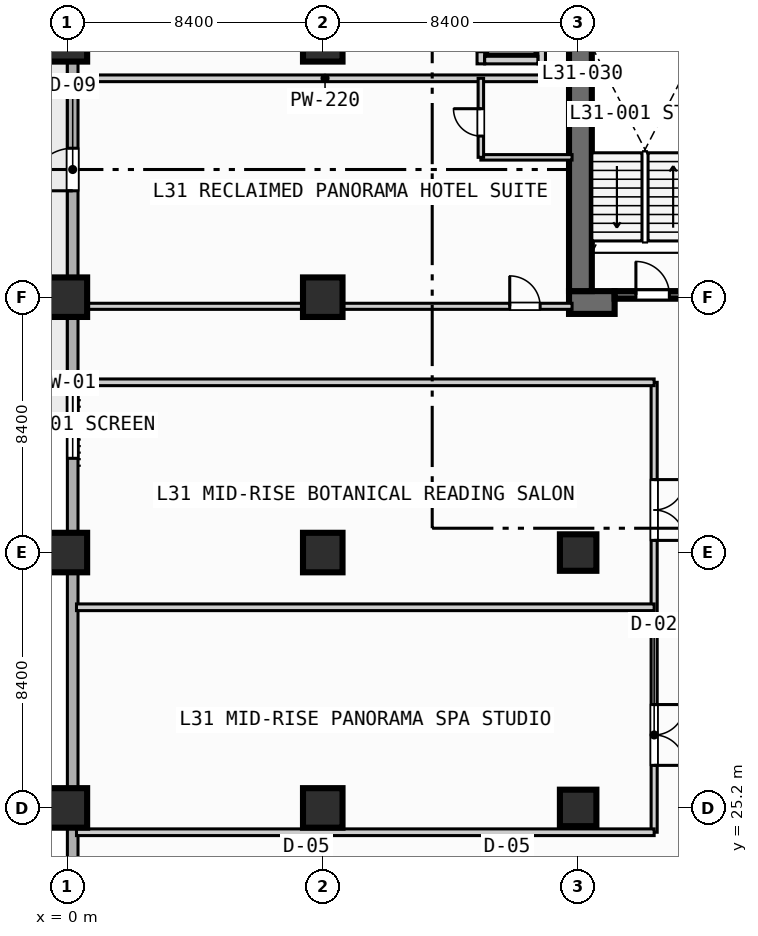
"""IFC4 building model, lengths in metres.
Left out: names, types, materials, properties, quantities, classifications, styles, units other than length and angle.
Written with IfcOpenShell. Run it as: python <this file> out.ifc"""

import sys

from ifc_helpers import new_model, si_unit, direction, frame, frame_2d, origin, origin_2d, place, context, subcontext, project, spatial, rectangle, extrude, element, fill, save


model = new_model("IFC4")
c1 = context("Model", 3, precision=1e-05, world=origin(), true_north=direction((0.0, 1.0)))
c2 = subcontext(c1, "Body", "Model", "MODEL_VIEW")
j1 = project(units=[si_unit("LENGTHUNIT", "METRE"), si_unit("PLANEANGLEUNIT", "RADIAN")], contexts=[c1])
p1 = place(None, origin())
s1 = spatial("IfcSite", under=j1, at=p1, CompositionType="ELEMENT")
p2 = place(p1, origin())
s2 = spatial("IfcBuilding", under=s1, at=p2, CompositionType="ELEMENT")
p3 = place(p2, frame((0.0, 0.0, 130.4)))
s3 = spatial("IfcBuildingStorey", under=s2, at=p3, CompositionType="ELEMENT", Elevation=130.4)
p4 = place(p3, frame((16.5, 41.825, 0.0), z_axis=(0.0, 0.0, 1.0), x_axis=(1.0, 0.0, 0.0)))
e1 = element("IfcWall", 1, at=p4, inside=s3, PredefinedType="SHEAR", context=c2, shape_type="SweptSolid", body=[
    extrude(rectangle(XDim=1.5, YDim=0.75, at=frame_2d((0.75, 0.0))), origin(), (0.0, 0.0, 1.0), 3.55),
])
p5 = place(p3, frame((16.875, 42.2, 0.0), z_axis=(0.0, 0.0, 1.0), x_axis=(0.0, 1.0, 0.0)))
e2 = element("IfcWall", 2, at=p5, inside=s3, PredefinedType="SHEAR", context=c2, shape_type="SweptSolid", body=[
    extrude(rectangle(XDim=16.35, YDim=0.75, at=frame_2d((8.175, 0.0))), origin(), (0.0, 0.0, 1.0), 3.55),
])
for number, where, z_axis, x_axis in (
    (3, (0.0, 25.2, 0.0), (0.0, 0.0, 1.0), (1.0, 0.0, 0.0)),
    (4, (0.0, 33.6, 0.0), (0.0, 0.0, 1.0), (1.0, 0.0, 0.0)),
    (5, (0.0, 42.0, 0.0), (0.0, 0.0, 1.0), (1.0, 0.0, 0.0)),
    (6, (0.0, 50.4, 0.0), (0.0, 0.0, 1.0), (1.0, 0.0, 0.0)),
    (7, (8.4, 25.2, 0.0), (0.0, 0.0, 1.0), (1.0, 0.0, 0.0)),
    (8, (8.4, 33.6, 0.0), (0.0, 0.0, 1.0), (1.0, 0.0, 0.0)),
    (9, (8.4, 42.0, 0.0), (0.0, 0.0, 1.0), (1.0, 0.0, 0.0)),
    (10, (8.4, 50.4, 0.0), (0.0, 0.0, 1.0), (1.0, 0.0, 0.0)),
):
    element("IfcColumn", number, at=place(p3, frame(where, z_axis=z_axis, x_axis=x_axis)), inside=s3, PredefinedType="COLUMN", context=c2, shape_type="SweptSolid", body=[
        extrude(rectangle(XDim=1.3, YDim=1.3, at=origin_2d()), origin(), (0.0, 0.0, 1.0), 3.8),
    ])
for number, where, z_axis, x_axis in (
    (11, (16.8, 25.2, 0.0), (0.0, 0.0, 1.0), (1.0, 0.0, 0.0)),
    (12, (16.8, 33.6, 0.0), (0.0, 0.0, 1.0), (1.0, 0.0, 0.0)),
):
    element("IfcColumn", number, at=place(p3, frame(where, z_axis=z_axis, x_axis=x_axis)), inside=s3, PredefinedType="COLUMN", context=c2, shape_type="SweptSolid", body=[
        extrude(rectangle(XDim=1.2, YDim=1.2, at=origin_2d()), origin(), (0.0, 0.0, 1.0), 3.8),
    ])
p6 = place(p3, frame((0.175, 3.175, 0.0), z_axis=(0.0, 0.0, 1.0), x_axis=(0.0, 1.0, 0.0)))
e13 = element("IfcWall", 13, at=p6, inside=s3, PredefinedType="STANDARD", context=c2, shape_type="SweptSolid", body=[
    extrude(rectangle(XDim=86.05, YDim=0.35, at=frame_2d((43.025, 0.0))), origin(), (0.0, 0.0, 1.0), 3.55),
])
p7 = place(p6, frame((42.325, 0.0, 0.0)))
e14 = element("IfcOpeningElement", 14, at=p7, cuts=e13, PredefinedType="OPENING", context=c2, shape_type="SweptSolid", body=[
    extrude(rectangle(XDim=1.4, YDim=2.2, at=frame_2d((0.7, 1.1))), frame((0.0, 0.185, 0.0), z_axis=(0.0, -1.0, 0.0), x_axis=(1.0, 0.0, 0.0)), (0.0, 0.0, 1.0), 0.37),
])
p8 = place(p6, frame((33.525, 0.0, 0.85)))
e15 = element("IfcOpeningElement", 15, at=p8, cuts=e13, PredefinedType="OPENING", context=c2, shape_type="SweptSolid", body=[
    extrude(rectangle(XDim=2.2, YDim=1.8, at=frame_2d((1.1, 0.9))), frame((0.0, 0.185, 0.0), z_axis=(0.0, -1.0, 0.0), x_axis=(1.0, 0.0, 0.0)), (0.0, 0.0, 1.0), 0.37),
])
p9 = place(p6, frame((58.725, 0.0, 0.85)))
e16 = element("IfcOpeningElement", 16, at=p9, cuts=e13, PredefinedType="OPENING", context=c2, shape_type="SweptSolid", body=[
    extrude(rectangle(XDim=2.2, YDim=1.8, at=frame_2d((1.1, 0.9))), frame((0.0, 0.185, 0.0), z_axis=(0.0, -1.0, 0.0), x_axis=(1.0, 0.0, 0.0)), (0.0, 0.0, 1.0), 0.37),
])
p10 = place(p6, frame((65.125, 0.0, 0.85)))
e17 = element("IfcOpeningElement", 17, at=p10, cuts=e13, PredefinedType="OPENING", context=c2, shape_type="SweptSolid", body=[
    extrude(rectangle(XDim=1.8, YDim=1.8, at=frame_2d((0.9, 0.9))), frame((0.0, 0.185, 0.0), z_axis=(0.0, -1.0, 0.0), x_axis=(1.0, 0.0, 0.0)), (0.0, 0.0, 1.0), 0.37),
])
p11 = place(p6, frame((73.275, 0.0, 0.85)))
e18 = element("IfcOpeningElement", 18, at=p11, cuts=e13, PredefinedType="OPENING", context=c2, shape_type="SweptSolid", body=[
    extrude(rectangle(XDim=1.8, YDim=1.8, at=frame_2d((0.9, 0.9))), frame((0.0, 0.185, 0.0), z_axis=(0.0, -1.0, 0.0), x_axis=(1.0, 0.0, 0.0)), (0.0, 0.0, 1.0), 0.37),
])
p12 = place(p6, frame((81.625, 0.0, 0.85)))
e19 = element("IfcOpeningElement", 19, at=p12, cuts=e13, PredefinedType="OPENING", context=c2, shape_type="SweptSolid", body=[
    extrude(rectangle(XDim=1.8, YDim=1.8, at=frame_2d((0.9, 0.9))), frame((0.0, 0.185, 0.0), z_axis=(0.0, -1.0, 0.0), x_axis=(1.0, 0.0, 0.0)), (0.0, 0.0, 1.0), 0.37),
])
p13 = place(p3, frame((18.0, 42.075, 0.0), z_axis=(0.0, 0.0, 1.0), x_axis=(1.0, 0.0, 0.0)))
e20 = element("IfcWall", 20, at=p13, inside=s3, PredefinedType="SOLIDWALL", context=c2, shape_type="SweptSolid", body=[
    extrude(rectangle(XDim=2.5, YDim=0.25, at=frame_2d((1.25, 0.0))), origin(), (0.0, 0.0, 1.0), 3.55),
])
p14 = place(p13, frame((0.7, 0.0, 0.0)))
e21 = element("IfcOpeningElement", 21, at=p14, cuts=e20, PredefinedType="OPENING", context=c2, shape_type="SweptSolid", body=[
    extrude(rectangle(XDim=1.1, YDim=2.15, at=frame_2d((0.55, 1.075))), frame((0.0, 0.135, 0.0), z_axis=(0.0, -1.0, 0.0), x_axis=(1.0, 0.0, 0.0)), (0.0, 0.0, 1.0), 0.27),
])
p15 = place(p3, frame((13.6, 49.675, 0.0), z_axis=(0.0, 0.0, 1.0), x_axis=(0.0, 1.0, 0.0)))
e22 = element("IfcWall", 22, at=p15, inside=s3, PredefinedType="SOLIDWALL", context=c2, shape_type="SweptSolid", body=[
    extrude(rectangle(XDim=2.75, YDim=0.25, at=frame_2d((1.375, 0.0))), origin(), (0.0, 0.0, 1.0), 3.55),
])
p16 = place(p15, frame((0.4, 0.0, 0.0)))
e23 = element("IfcOpeningElement", 23, at=p16, cuts=e22, PredefinedType="OPENING", context=c2, shape_type="SweptSolid", body=[
    extrude(rectangle(XDim=1.1, YDim=2.15, at=frame_2d((0.55, 1.075))), frame((0.0, 0.135, 0.0), z_axis=(0.0, -1.0, 0.0), x_axis=(1.0, 0.0, 0.0)), (0.0, 0.0, 1.0), 0.27),
])
p17 = place(p3, frame((15.6, 49.675, 0.0), z_axis=(0.0, 0.0, 1.0), x_axis=(0.0, 1.0, 0.0)))
e24 = element("IfcWall", 24, at=p17, inside=s3, PredefinedType="SOLIDWALL", context=c2, shape_type="SweptSolid", body=[
    extrude(rectangle(XDim=2.75, YDim=0.25, at=frame_2d((1.375, 0.0))), origin(), (0.0, 0.0, 1.0), 3.55),
])
p18 = place(p3, frame((13.725, 49.8, 0.0), z_axis=(0.0, 0.0, 1.0), x_axis=(1.0, 0.0, 0.0)))
e25 = element("IfcWall", 25, at=p18, inside=s3, PredefinedType="SOLIDWALL", context=c2, shape_type="SweptSolid", body=[
    extrude(rectangle(XDim=1.75, YDim=0.25, at=frame_2d((0.875, 0.0))), origin(), (0.0, 0.0, 1.0), 3.55),
])
p19 = place(p3, frame((0.35, 41.7, 0.0), z_axis=(0.0, 0.0, 1.0), x_axis=(1.0, 0.0, 0.0)))
e26 = element("IfcWall", 26, at=p19, inside=s3, PredefinedType="PARTITIONING", context=c2, shape_type="SweptSolid", body=[
    extrude(rectangle(XDim=16.25, YDim=0.2, at=frame_2d((8.125, 0.0))), origin(), (0.0, 0.0, 1.0), 2.8),
])
p20 = place(p19, frame((14.2, 0.0, 0.0)))
e27 = element("IfcOpeningElement", 27, at=p20, cuts=e26, PredefinedType="OPENING", context=c2, shape_type="SweptSolid", body=[
    extrude(rectangle(XDim=1.0, YDim=2.15, at=frame_2d((0.5, 1.075))), frame((0.0, 0.11, 0.0), z_axis=(0.0, -1.0, 0.0), x_axis=(1.0, 0.0, 0.0)), (0.0, 0.0, 1.0), 0.22),
])
p21 = place(p3, frame((0.35, 49.2, 0.0), z_axis=(0.0, 0.0, 1.0), x_axis=(1.0, 0.0, 0.0)))
e28 = element("IfcWall", 28, at=p21, inside=s3, PredefinedType="PARTITIONING", context=c2, shape_type="SweptSolid", body=[
    extrude(rectangle(XDim=16.25, YDim=0.22, at=frame_2d((8.125, 0.0))), origin(), (0.0, 0.0, 1.0), 3.55),
])
p22 = place(p3, frame((13.6, 46.6, 0.0), z_axis=(0.0, 0.0, 1.0), x_axis=(1.0, 0.0, 0.0)))
e29 = element("IfcWall", 29, at=p22, inside=s3, PredefinedType="PLUMBINGWALL", context=c2, shape_type="SweptSolid", body=[
    extrude(rectangle(XDim=3.0, YDim=0.18, at=frame_2d((1.5, 0.0))), origin(), (0.0, 0.0, 1.0), 3.55),
])
p23 = place(p3, frame((13.6, 46.6, 0.0), z_axis=(0.0, 0.0, 1.0), x_axis=(0.0, 1.0, 0.0)))
e30 = element("IfcWall", 30, at=p23, inside=s3, PredefinedType="PLUMBINGWALL", context=c2, shape_type="SweptSolid", body=[
    extrude(rectangle(XDim=2.6, YDim=0.18, at=frame_2d((1.3, 0.0))), origin(), (0.0, 0.0, 1.0), 3.55),
])
p24 = place(p23, frame((0.7, 0.0, 0.0)))
e31 = element("IfcOpeningElement", 31, at=p24, cuts=e30, PredefinedType="OPENING", context=c2, shape_type="SweptSolid", body=[
    extrude(rectangle(XDim=0.9, YDim=2.1, at=frame_2d((0.45, 1.05))), frame((0.0, 0.1, 0.0), z_axis=(0.0, -1.0, 0.0), x_axis=(1.0, 0.0, 0.0)), (0.0, 0.0, 1.0), 0.2),
])
p25 = place(p3, frame((19.3, 24.4, 0.0), z_axis=(0.0, 0.0, 1.0), x_axis=(0.0, 1.0, 0.0)))
e32 = element("IfcWall", 32, at=p25, inside=s3, PredefinedType="PARTITIONING", context=c2, shape_type="SweptSolid", body=[
    extrude(rectangle(XDim=14.8, YDim=0.2, at=frame_2d((7.4, 0.0))), origin(), (0.0, 0.0, 1.0), 3.55),
])
p26 = place(p25, frame((2.2, 0.0, 0.0)))
e33 = element("IfcOpeningElement", 33, at=p26, cuts=e32, PredefinedType="OPENING", context=c2, shape_type="SweptSolid", body=[
    extrude(rectangle(XDim=2.0, YDim=2.15, at=frame_2d((1.0, 1.075))), frame((0.0, 0.11, 0.0), z_axis=(0.0, -1.0, 0.0), x_axis=(1.0, 0.0, 0.0)), (0.0, 0.0, 1.0), 0.22),
])
p27 = place(p25, frame((9.6, 0.0, 0.0)))
e34 = element("IfcOpeningElement", 34, at=p27, cuts=e32, PredefinedType="OPENING", context=c2, shape_type="SweptSolid", body=[
    extrude(rectangle(XDim=2.0, YDim=2.15, at=frame_2d((1.0, 1.075))), frame((0.0, 0.11, 0.0), z_axis=(0.0, -1.0, 0.0), x_axis=(1.0, 0.0, 0.0)), (0.0, 0.0, 1.0), 0.22),
])
for number, where, z_axis, x_axis in (
    (35, (0.3, 24.4, 0.0), (0.0, 0.0, 1.0), (1.0, 0.0, 0.0)),
    (36, (0.3, 31.8, 0.0), (0.0, 0.0, 1.0), (1.0, 0.0, 0.0)),
    (37, (0.3, 39.2, 0.0), (0.0, 0.0, 1.0), (1.0, 0.0, 0.0)),
):
    element("IfcWall", number, at=place(p3, frame(where, z_axis=z_axis, x_axis=x_axis)), inside=s3, PredefinedType="PARTITIONING", context=c2, shape_type="SweptSolid", body=[
        extrude(rectangle(XDim=19.0, YDim=0.22, at=frame_2d((9.5, 0.0))), origin(), (0.0, 0.0, 1.0), 3.55),
    ])
p28 = place(p7, origin())
e38 = element("IfcDoor", 38, at=p28, inside=s3, OperationType="SINGLE_SWING_LEFT", PredefinedType="DOOR", context=c2, shape_type="SweptSolid", body=[
    extrude(rectangle(XDim=1.4, YDim=2.2, at=frame_2d((0.7, 1.1))), frame((0.0, 0.025, 0.0), z_axis=(0.0, -1.0, 0.0), x_axis=(1.0, 0.0, 0.0)), (0.0, 0.0, 1.0), 0.05),
])
fill(e14, e38)
p29 = place(p8, origin())
e39 = element("IfcWindow", 39, at=p29, inside=s3, PartitioningType="SINGLE_PANEL", PredefinedType="WINDOW", context=c2, shape_type="SweptSolid", body=[
    extrude(rectangle(XDim=2.2, YDim=1.8, at=frame_2d((1.1, 0.9))), frame((0.0, 0.03, 0.0), z_axis=(0.0, -1.0, 0.0), x_axis=(1.0, 0.0, 0.0)), (0.0, 0.0, 1.0), 0.06),
])
fill(e15, e39)
p30 = place(p14, origin())
e40 = element("IfcDoor", 40, at=p30, inside=s3, OperationType="SINGLE_SWING_LEFT", PredefinedType="DOOR", context=c2, shape_type="SweptSolid", body=[
    extrude(rectangle(XDim=1.1, YDim=2.15, at=frame_2d((0.55, 1.075))), frame((0.0, 0.025, 0.0), z_axis=(0.0, -1.0, 0.0), x_axis=(1.0, 0.0, 0.0)), (0.0, 0.0, 1.0), 0.05),
])
fill(e21, e40)
p31 = place(p20, origin())
e41 = element("IfcDoor", 41, at=p31, inside=s3, OperationType="SINGLE_SWING_LEFT", PredefinedType="DOOR", context=c2, shape_type="SweptSolid", body=[
    extrude(rectangle(XDim=1.0, YDim=2.15, at=frame_2d((0.5, 1.075))), frame((0.0, 0.025, 0.0), z_axis=(0.0, -1.0, 0.0), x_axis=(1.0, 0.0, 0.0)), (0.0, 0.0, 1.0), 0.05),
])
fill(e27, e41)
p32 = place(p24, origin())
e42 = element("IfcDoor", 42, at=p32, inside=s3, OperationType="SINGLE_SWING_RIGHT", PredefinedType="DOOR", context=c2, shape_type="SweptSolid", body=[
    extrude(rectangle(XDim=0.9, YDim=2.1, at=frame_2d((0.45, 1.05))), frame((0.0, 0.025, 0.0), z_axis=(0.0, -1.0, 0.0), x_axis=(1.0, 0.0, 0.0)), (0.0, 0.0, 1.0), 0.05),
])
fill(e31, e42)
p33 = place(p26, origin())
e43 = element("IfcDoor", 43, at=p33, inside=s3, OperationType="SINGLE_SWING_RIGHT", PredefinedType="DOOR", context=c2, shape_type="SweptSolid", body=[
    extrude(rectangle(XDim=2.0, YDim=2.15, at=frame_2d((1.0, 1.075))), frame((0.0, 0.025, 0.0), z_axis=(0.0, -1.0, 0.0), x_axis=(1.0, 0.0, 0.0)), (0.0, 0.0, 1.0), 0.05),
])
fill(e33, e43)
p34 = place(p27, origin())
e44 = element("IfcDoor", 44, at=p34, inside=s3, OperationType="SINGLE_SWING_RIGHT", PredefinedType="DOOR", context=c2, shape_type="SweptSolid", body=[
    extrude(rectangle(XDim=2.0, YDim=2.15, at=frame_2d((1.0, 1.075))), frame((0.0, 0.025, 0.0), z_axis=(0.0, -1.0, 0.0), x_axis=(1.0, 0.0, 0.0)), (0.0, 0.0, 1.0), 0.05),
])
fill(e34, e44)
save(model, sys.argv[1])
